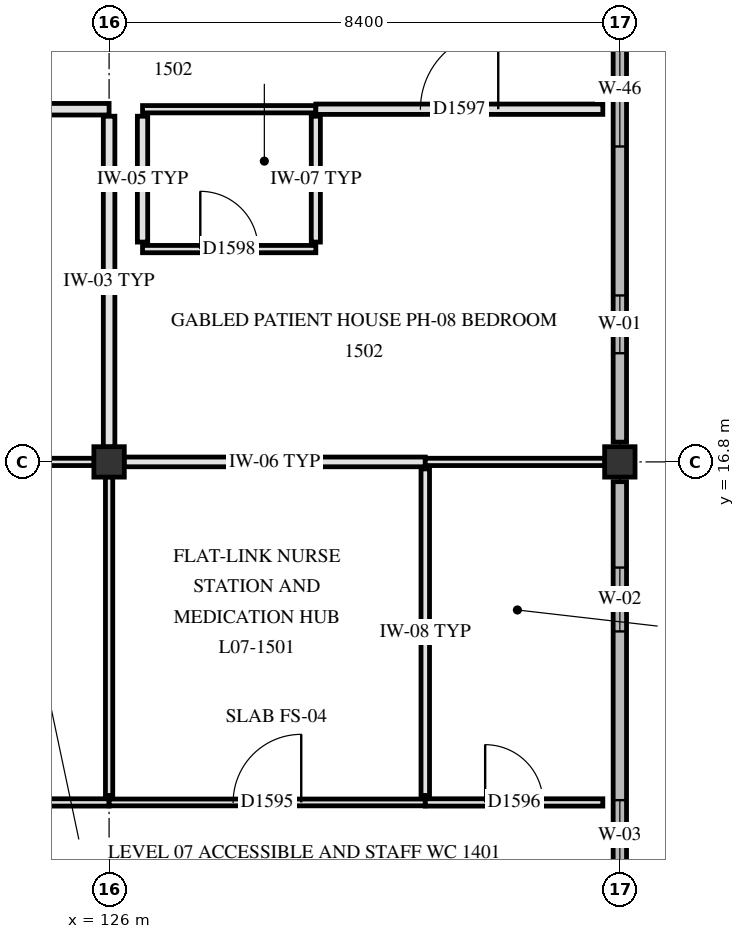
"""IFC4 building model, lengths in metres.
Left out: names, types, materials, properties, quantities, classifications, styles, units other than length and angle.
Written with IfcOpenShell. Run it as: python <this file> out.ifc"""

import sys

from ifc_helpers import new_model, si_unit, direction, frame, frame_2d, origin, origin_2d, place, context, subcontext, project, spatial, rectangle, extrude, element, fill, save


model = new_model("IFC4")
c1 = context("Model", 3, precision=1e-05, world=origin(), true_north=direction((0.0, 1.0)))
c2 = subcontext(c1, "Body", "Model", "MODEL_VIEW")
j1 = project(units=[si_unit("LENGTHUNIT", "METRE"), si_unit("PLANEANGLEUNIT", "RADIAN")], contexts=[c1])
p1 = place(None, origin())
s1 = spatial("IfcSite", under=j1, at=p1, CompositionType="ELEMENT")
p2 = place(p1, origin())
s2 = spatial("IfcBuilding", under=s1, at=p2, CompositionType="ELEMENT")
p3 = place(p2, frame((0.0, 0.0, 30.3)))
s3 = spatial("IfcBuildingStorey", under=s2, at=p3, CompositionType="ELEMENT", Elevation=30.3)
for number, where, z_axis, x_axis in (
    (1, (126.0, 16.8, 0.0), (0.0, 0.0, 1.0), (1.0, 0.0, 0.0)),
    (2, (134.4, 16.8, 0.0), (0.0, 0.0, 1.0), (1.0, 0.0, 0.0)),
):
    element("IfcColumn", number, at=place(p3, frame(where, z_axis=z_axis, x_axis=x_axis)), inside=s3, PredefinedType="COLUMN", context=c2, shape_type="SweptSolid", body=[
        extrude(rectangle(XDim=0.5, YDim=0.5, at=origin_2d()), origin(), (0.0, 0.0, 1.0), 3.9),
    ])
p4 = place(p3, frame((134.4, 24.875, 0.0), z_axis=(0.0, 0.0, 1.0), x_axis=(0.0, -1.0, 0.0)))
e3 = element("IfcWall", 3, at=p4, inside=s3, PredefinedType="SOLIDWALL", context=c2, shape_type="SweptSolid", body=[
    extrude(rectangle(XDim=7.75, YDim=0.22, at=frame_2d((3.875, 0.0))), origin(), (0.0, 0.0, 1.0), 3.42),
])
p5 = place(p4, frame((0.988, 0.0, 0.85)))
e4 = element("IfcOpeningElement", 4, at=p5, cuts=e3, PredefinedType="OPENING", context=c2, shape_type="SweptSolid", body=[
    extrude(rectangle(XDim=1.9, YDim=1.78, at=frame_2d((0.95, 0.89))), frame((0.0, 0.12, 0.0), z_axis=(0.0, -1.0, 0.0), x_axis=(1.0, 0.0, 0.0)), (0.0, 0.0, 1.0), 0.24),
])
p6 = place(p4, frame((5.337, 0.0, 0.85)))
e5 = element("IfcOpeningElement", 5, at=p6, cuts=e3, PredefinedType="OPENING", context=c2, shape_type="SweptSolid", body=[
    extrude(rectangle(XDim=0.95, YDim=1.3, at=frame_2d((0.475, 0.65))), frame((0.0, 0.12, 0.0), z_axis=(0.0, -1.0, 0.0), x_axis=(1.0, 0.0, 0.0)), (0.0, 0.0, 1.0), 0.24),
])
p7 = place(p3, frame((134.4, 16.475, 0.0), z_axis=(0.0, 0.0, 1.0), x_axis=(0.0, -1.0, 0.0)))
e6 = element("IfcWall", 6, at=p7, inside=s3, PredefinedType="SOLIDWALL", context=c2, shape_type="SweptSolid", body=[
    extrude(rectangle(XDim=7.75, YDim=0.22, at=frame_2d((3.875, 0.0))), origin(), (0.0, 0.0, 1.0), 3.42),
])
p8 = place(p7, frame((1.413, 0.0, 0.85)))
e7 = element("IfcOpeningElement", 7, at=p8, cuts=e6, PredefinedType="OPENING", context=c2, shape_type="SweptSolid", body=[
    extrude(rectangle(XDim=1.05, YDim=1.3, at=frame_2d((0.525, 0.65))), frame((0.0, 0.12, 0.0), z_axis=(0.0, -1.0, 0.0), x_axis=(1.0, 0.0, 0.0)), (0.0, 0.0, 1.0), 0.24),
])
p9 = place(p7, frame((5.238, 0.0, 0.85)))
e8 = element("IfcOpeningElement", 8, at=p9, cuts=e6, PredefinedType="OPENING", context=c2, shape_type="SweptSolid", body=[
    extrude(rectangle(XDim=1.15, YDim=1.3, at=frame_2d((0.575, 0.65))), frame((0.0, 0.12, 0.0), z_axis=(0.0, -1.0, 0.0), x_axis=(1.0, 0.0, 0.0)), (0.0, 0.0, 1.0), 0.24),
])
p10 = place(p3, frame((122.8, 11.2, 0.0), z_axis=(0.0, 0.0, 1.0), x_axis=(1.0, 0.0, 0.0)))
e9 = element("IfcWall", 9, at=p10, inside=s3, PredefinedType="PARTITIONING", context=c2, shape_type="SweptSolid", body=[
    extrude(rectangle(XDim=3.2, YDim=0.12, at=frame_2d((1.6, 0.0))), origin(), (0.0, 0.0, 1.0), 3.25),
])
p11 = place(p10, frame((1.125, 0.0, 0.0)))
e10 = element("IfcOpeningElement", 10, at=p11, cuts=e9, PredefinedType="OPENING", context=c2, shape_type="SweptSolid", body=[
    extrude(rectangle(XDim=0.95, YDim=2.1, at=frame_2d((0.475, 1.05))), frame((0.0, 0.07, 0.0), z_axis=(0.0, -1.0, 0.0), x_axis=(1.0, 0.0, 0.0)), (0.0, 0.0, 1.0), 0.14),
])
p12 = place(p3, frame((126.0, 11.2, 0.0), z_axis=(0.0, 0.0, 1.0), x_axis=(1.0, 0.0, 0.0)))
e11 = element("IfcWall", 11, at=p12, inside=s3, PredefinedType="PARTITIONING", context=c2, shape_type="SweptSolid", body=[
    extrude(rectangle(XDim=5.2, YDim=0.112, at=frame_2d((2.6, 0.0))), origin(), (0.0, 0.0, 1.0), 3.25),
])
p13 = place(p12, frame((2.04, 0.0, 0.0)))
e12 = element("IfcOpeningElement", 12, at=p13, cuts=e11, PredefinedType="OPENING", context=c2, shape_type="SweptSolid", body=[
    extrude(rectangle(XDim=1.12, YDim=2.18, at=frame_2d((0.56, 1.09))), frame((0.0, 0.066, 0.0), z_axis=(0.0, -1.0, 0.0), x_axis=(1.0, 0.0, 0.0)), (0.0, 0.0, 1.0), 0.132),
])
p14 = place(p3, frame((131.2, 11.2, 0.0), z_axis=(0.0, 0.0, 1.0), x_axis=(1.0, 0.0, 0.0)))
e13 = element("IfcWall", 13, at=p14, inside=s3, PredefinedType="PARTITIONING", context=c2, shape_type="SweptSolid", body=[
    extrude(rectangle(XDim=2.92, YDim=0.12, at=frame_2d((1.46, 0.0))), origin(), (0.0, 0.0, 1.0), 3.41),
])
p15 = place(p14, frame((0.985, 0.0, 0.0)))
e14 = element("IfcOpeningElement", 14, at=p15, cuts=e13, PredefinedType="OPENING", context=c2, shape_type="SweptSolid", body=[
    extrude(rectangle(XDim=0.95, YDim=2.1, at=frame_2d((0.475, 1.05))), frame((0.0, 0.07, 0.0), z_axis=(0.0, -1.0, 0.0), x_axis=(1.0, 0.0, 0.0)), (0.0, 0.0, 1.0), 0.14),
])
p16 = place(p3, frame((122.8, 16.8, 0.0), z_axis=(0.0, 0.0, 1.0), x_axis=(1.0, 0.0, 0.0)))
e15 = element("IfcWall", 15, at=p16, inside=s3, PredefinedType="PARTITIONING", context=c2, shape_type="SweptSolid", body=[
    extrude(rectangle(XDim=2.955, YDim=0.12, at=frame_2d((1.478, 0.0))), origin(), (0.0, 0.0, 1.0), 3.25),
])
p17 = place(p3, frame((126.245, 16.8, 0.0), z_axis=(0.0, 0.0, 1.0), x_axis=(1.0, 0.0, 0.0)))
e16 = element("IfcWall", 16, at=p17, inside=s3, PredefinedType="PARTITIONING", context=c2, shape_type="SweptSolid", body=[
    extrude(rectangle(XDim=4.955, YDim=0.16, at=frame_2d((2.478, 0.0))), origin(), (0.0, 0.0, 1.0), 3.25),
])
p18 = place(p3, frame((131.2, 16.8, 0.0), z_axis=(0.0, 0.0, 1.0), x_axis=(1.0, 0.0, 0.0)))
e17 = element("IfcWall", 17, at=p18, inside=s3, PredefinedType="PARTITIONING", context=c2, shape_type="SweptSolid", body=[
    extrude(rectangle(XDim=2.955, YDim=0.12, at=frame_2d((1.478, 0.0))), origin(), (0.0, 0.0, 1.0), 3.25),
])
p19 = place(p3, frame((126.55, 20.3, 0.0), z_axis=(0.0, 0.0, 1.0), x_axis=(1.0, 0.0, 0.0)))
e18 = element("IfcWall", 18, at=p19, inside=s3, PredefinedType="PARTITIONING", context=c2, shape_type="SweptSolid", body=[
    extrude(rectangle(XDim=2.85, YDim=0.12, at=frame_2d((1.425, 0.0))), origin(), (0.0, 0.0, 1.0), 3.65),
])
p20 = place(p19, frame((0.95, 0.0, 0.0)))
e19 = element("IfcOpeningElement", 19, at=p20, cuts=e18, PredefinedType="OPENING", context=c2, shape_type="SweptSolid", body=[
    extrude(rectangle(XDim=0.95, YDim=2.1, at=frame_2d((0.475, 1.05))), frame((0.0, 0.07, 0.0), z_axis=(0.0, -1.0, 0.0), x_axis=(1.0, 0.0, 0.0)), (0.0, 0.0, 1.0), 0.14),
])
p21 = place(p3, frame((121.0, 22.6, 0.0), z_axis=(0.0, 0.0, 1.0), x_axis=(1.0, 0.0, 0.0)))
e20 = element("IfcWall", 20, at=p21, inside=s3, PredefinedType="PARTITIONING", context=c2, shape_type="SweptSolid", body=[
    extrude(rectangle(XDim=5.0, YDim=0.19, at=frame_2d((2.5, 0.0))), origin(), (0.0, 0.0, 1.0), 3.25),
])
p22 = place(p21, frame((1.99, 0.0, 0.0)))
e21 = element("IfcOpeningElement", 21, at=p22, cuts=e20, PredefinedType="OPENING", context=c2, shape_type="SweptSolid", body=[
    extrude(rectangle(XDim=1.02, YDim=2.12, at=frame_2d((0.51, 1.06))), frame((0.0, 0.105, 0.0), z_axis=(0.0, -1.0, 0.0), x_axis=(1.0, 0.0, 0.0)), (0.0, 0.0, 1.0), 0.21),
])
p23 = place(p3, frame((126.55, 22.6, 0.0), z_axis=(0.0, 0.0, 1.0), x_axis=(1.0, 0.0, 0.0)))
e22 = element("IfcWall", 22, at=p23, inside=s3, PredefinedType="PARTITIONING", context=c2, shape_type="SweptSolid", body=[
    extrude(rectangle(XDim=2.85, YDim=0.12, at=frame_2d((1.425, 0.0))), origin(), (0.0, 0.0, 1.0), 3.65),
])
p24 = place(p3, frame((129.4, 22.6, 0.0), z_axis=(0.0, 0.0, 1.0), x_axis=(1.0, 0.0, 0.0)))
e23 = element("IfcWall", 23, at=p24, inside=s3, PredefinedType="PARTITIONING", context=c2, shape_type="SweptSolid", body=[
    extrude(rectangle(XDim=4.72, YDim=0.17, at=frame_2d((2.36, 0.0))), origin(), (0.0, 0.0, 1.0), 3.65),
])
p25 = place(p24, frame((1.72, 0.0, 0.0)))
e24 = element("IfcOpeningElement", 24, at=p25, cuts=e23, PredefinedType="OPENING", context=c2, shape_type="SweptSolid", body=[
    extrude(rectangle(XDim=1.28, YDim=2.18, at=frame_2d((0.64, 1.09))), frame((0.0, 0.095, 0.0), z_axis=(0.0, -1.0, 0.0), x_axis=(1.0, 0.0, 0.0)), (0.0, 0.0, 1.0), 0.19),
])
p26 = place(p3, frame((126.0, 11.315, 0.0), z_axis=(0.0, 0.0, 1.0), x_axis=(0.0, 1.0, 0.0)))
e25 = element("IfcWall", 25, at=p26, inside=s3, PredefinedType="PARTITIONING", context=c2, shape_type="SweptSolid", body=[
    extrude(rectangle(XDim=5.24, YDim=0.12, at=frame_2d((2.62, 0.0))), origin(), (0.0, 0.0, 1.0), 3.25),
])
p27 = place(p3, frame((126.0, 17.045, 0.0), z_axis=(0.0, 0.0, 1.0), x_axis=(0.0, 1.0, 0.0)))
e26 = element("IfcWall", 26, at=p27, inside=s3, PredefinedType="PARTITIONING", context=c2, shape_type="SweptSolid", body=[
    extrude(rectangle(XDim=5.44, YDim=0.19, at=frame_2d((2.72, 0.0))), origin(), (0.0, 0.0, 1.0), 3.25),
])
p28 = place(p3, frame((126.55, 20.415, 0.0), z_axis=(0.0, 0.0, 1.0), x_axis=(0.0, 1.0, 0.0)))
e27 = element("IfcWall", 27, at=p28, inside=s3, PredefinedType="PARTITIONING", context=c2, shape_type="SweptSolid", body=[
    extrude(rectangle(XDim=2.07, YDim=0.17, at=frame_2d((1.035, 0.0))), origin(), (0.0, 0.0, 1.0), 3.41),
])
p29 = place(p3, frame((129.4, 20.415, 0.0), z_axis=(0.0, 0.0, 1.0), x_axis=(0.0, 1.0, 0.0)))
e28 = element("IfcWall", 28, at=p29, inside=s3, PredefinedType="PARTITIONING", context=c2, shape_type="SweptSolid", body=[
    extrude(rectangle(XDim=2.07, YDim=0.15, at=frame_2d((1.035, 0.0))), origin(), (0.0, 0.0, 1.0), 3.41),
])
p30 = place(p3, frame((131.2, 11.315, 0.0), z_axis=(0.0, 0.0, 1.0), x_axis=(0.0, 1.0, 0.0)))
e29 = element("IfcWall", 29, at=p30, inside=s3, PredefinedType="PARTITIONING", context=c2, shape_type="SweptSolid", body=[
    extrude(rectangle(XDim=5.37, YDim=0.14, at=frame_2d((2.685, 0.0))), origin(), (0.0, 0.0, 1.0), 3.41),
])
p31 = place(p5, origin())
e30 = element("IfcWindow", 30, at=p31, inside=s3, PartitioningType="SINGLE_PANEL", PredefinedType="WINDOW", context=c2, shape_type="SweptSolid", body=[
    extrude(rectangle(XDim=1.9, YDim=1.78, at=frame_2d((0.95, 0.89))), frame((0.0, 0.03, 0.0), z_axis=(0.0, -1.0, 0.0), x_axis=(1.0, 0.0, 0.0)), (0.0, 0.0, 1.0), 0.06),
])
fill(e4, e30)
p32 = place(p6, origin())
e31 = element("IfcWindow", 31, at=p32, inside=s3, PartitioningType="SINGLE_PANEL", PredefinedType="WINDOW", context=c2, shape_type="SweptSolid", body=[
    extrude(rectangle(XDim=0.95, YDim=1.3, at=frame_2d((0.475, 0.65))), frame((0.0, 0.03, 0.0), z_axis=(0.0, -1.0, 0.0), x_axis=(1.0, 0.0, 0.0)), (0.0, 0.0, 1.0), 0.06),
])
fill(e5, e31)
p33 = place(p8, origin())
e32 = element("IfcWindow", 32, at=p33, inside=s3, PartitioningType="SINGLE_PANEL", PredefinedType="WINDOW", context=c2, shape_type="SweptSolid", body=[
    extrude(rectangle(XDim=1.05, YDim=1.3, at=frame_2d((0.525, 0.65))), frame((0.0, 0.03, 0.0), z_axis=(0.0, -1.0, 0.0), x_axis=(1.0, 0.0, 0.0)), (0.0, 0.0, 1.0), 0.06),
])
fill(e7, e32)
p34 = place(p9, origin())
e33 = element("IfcWindow", 33, at=p34, inside=s3, PartitioningType="SINGLE_PANEL", PredefinedType="WINDOW", context=c2, shape_type="SweptSolid", body=[
    extrude(rectangle(XDim=1.15, YDim=1.3, at=frame_2d((0.575, 0.65))), frame((0.0, 0.03, 0.0), z_axis=(0.0, -1.0, 0.0), x_axis=(1.0, 0.0, 0.0)), (0.0, 0.0, 1.0), 0.06),
])
fill(e8, e33)
p35 = place(p13, origin())
e34 = element("IfcDoor", 34, at=p35, inside=s3, OperationType="SINGLE_SWING_RIGHT", PredefinedType="DOOR", context=c2, shape_type="SweptSolid", body=[
    extrude(rectangle(XDim=1.12, YDim=2.18, at=frame_2d((0.56, 1.09))), frame((0.0, 0.025, 0.0), z_axis=(0.0, -1.0, 0.0), x_axis=(1.0, 0.0, 0.0)), (0.0, 0.0, 1.0), 0.05),
])
fill(e12, e34)
p36 = place(p15, origin())
e35 = element("IfcDoor", 35, at=p36, inside=s3, OperationType="SINGLE_SWING_LEFT", PredefinedType="DOOR", context=c2, shape_type="SweptSolid", body=[
    extrude(rectangle(XDim=0.95, YDim=2.1, at=frame_2d((0.475, 1.05))), frame((0.0, 0.025, 0.0), z_axis=(0.0, -1.0, 0.0), x_axis=(1.0, 0.0, 0.0)), (0.0, 0.0, 1.0), 0.05),
])
fill(e14, e35)
p37 = place(p25, origin())
e36 = element("IfcDoor", 36, at=p37, inside=s3, OperationType="SINGLE_SWING_RIGHT", PredefinedType="DOOR", context=c2, shape_type="SweptSolid", body=[
    extrude(rectangle(XDim=1.28, YDim=2.18, at=frame_2d((0.64, 1.09))), frame((0.0, 0.025, 0.0), z_axis=(0.0, -1.0, 0.0), x_axis=(1.0, 0.0, 0.0)), (0.0, 0.0, 1.0), 0.05),
])
fill(e24, e36)
p38 = place(p20, origin())
e37 = element("IfcDoor", 37, at=p38, inside=s3, OperationType="SINGLE_SWING_LEFT", PredefinedType="DOOR", context=c2, shape_type="SweptSolid", body=[
    extrude(rectangle(XDim=0.95, YDim=2.1, at=frame_2d((0.475, 1.05))), frame((0.0, 0.025, 0.0), z_axis=(0.0, -1.0, 0.0), x_axis=(1.0, 0.0, 0.0)), (0.0, 0.0, 1.0), 0.05),
])
fill(e19, e37)
save(model, sys.argv[1])
